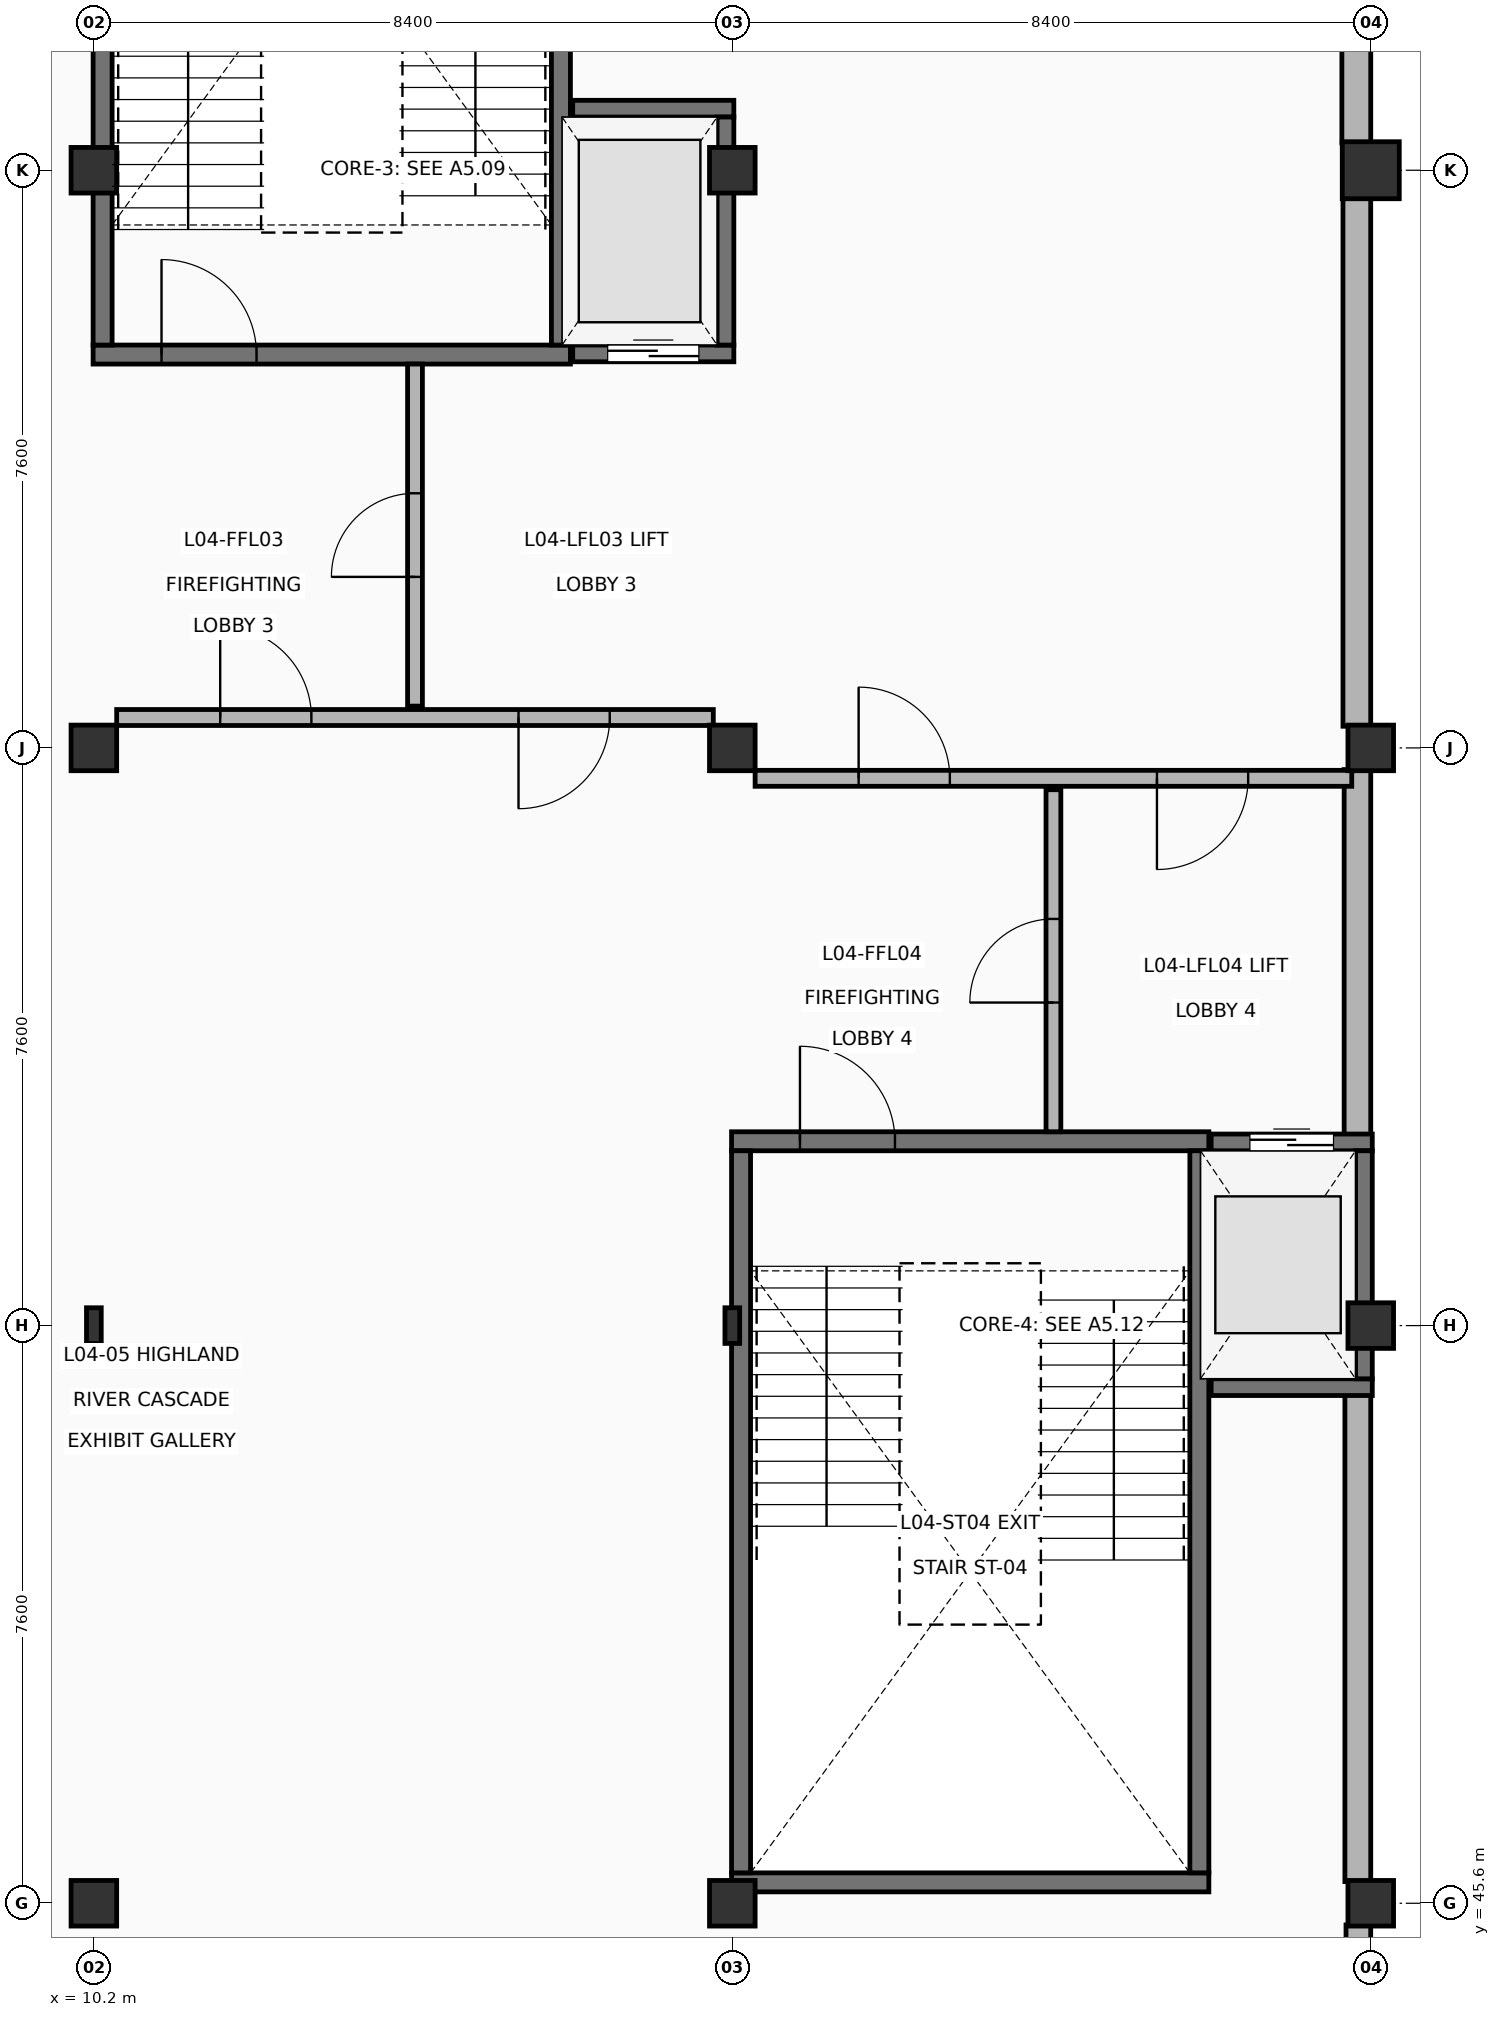
"""IFC4 building model, lengths in metres.
Left out: names, types, materials, properties, quantities, classifications, styles, units other than length and angle.
Written with IfcOpenShell. Run it as: python <this file> out.ifc"""

import sys

from ifc_helpers import new_model, si_unit, direction, frame, frame_2d, origin, origin_2d, place, context, subcontext, project, spatial, rectangle, circle, i_section, extrude, element, fill, save


model = new_model("IFC4")
c1 = context("Model", 3, precision=1e-05, world=origin(), true_north=direction((0.0, 1.0)))
c2 = subcontext(c1, "Body", "Model", "MODEL_VIEW")
j1 = project(units=[si_unit("LENGTHUNIT", "METRE"), si_unit("PLANEANGLEUNIT", "RADIAN")], contexts=[c1])
p1 = place(None, origin())
s1 = spatial("IfcSite", under=j1, at=p1, CompositionType="ELEMENT")
p2 = place(p1, origin())
s2 = spatial("IfcBuilding", under=s1, at=p2, CompositionType="ELEMENT")
p3 = place(p2, frame((0.0, 0.0, 15.3)))
s3 = spatial("IfcBuildingStorey", under=s2, at=p3, CompositionType="ELEMENT", Elevation=15.3)
p4 = place(p3, frame((10.2, 45.6, 0.0), z_axis=(0.0, 0.0, 1.0), x_axis=(1.0, 0.0, 0.0)))
e1 = element("IfcColumn", 1, at=p4, inside=s3, PredefinedType="COLUMN", context=c2, shape_type="SweptSolid", body=[
    extrude(rectangle(XDim=0.6, YDim=0.6, at=origin_2d()), origin(), (0.0, 0.0, 1.0), 4.5),
])
p5 = place(p3, frame((10.2, 53.2, 0.0), z_axis=(0.0, 0.0, 1.0), x_axis=(1.0, 0.0, 0.0)))
e2 = element("IfcColumn", 2, at=p5, inside=s3, PredefinedType="COLUMN", context=c2, shape_type="SweptSolid", body=[
    extrude(i_section(OverallWidth=0.194, OverallDepth=0.469, WebThickness=0.013, FlangeThickness=0.021, at=origin_2d()), origin(), (0.0, 0.0, 1.0), 4.5),
])
for number, where, z_axis, x_axis in (
    (3, (10.2, 60.8, 0.0), (0.0, 0.0, 1.0), (1.0, 0.0, 0.0)),
    (4, (10.2, 68.4, 0.0), (0.0, 0.0, 1.0), (1.0, 0.0, 0.0)),
    (5, (18.6, 45.6, 0.0), (0.0, 0.0, 1.0), (1.0, 0.0, 0.0)),
):
    element("IfcColumn", number, at=place(p3, frame(where, z_axis=z_axis, x_axis=x_axis)), inside=s3, PredefinedType="COLUMN", context=c2, shape_type="SweptSolid", body=[
        extrude(rectangle(XDim=0.6, YDim=0.6, at=origin_2d()), origin(), (0.0, 0.0, 1.0), 4.5),
    ])
p6 = place(p3, frame((18.6, 53.2, 0.0), z_axis=(0.0, 0.0, 1.0), x_axis=(1.0, 0.0, 0.0)))
e6 = element("IfcColumn", 6, at=p6, inside=s3, PredefinedType="COLUMN", context=c2, shape_type="SweptSolid", body=[
    extrude(i_section(OverallWidth=0.194, OverallDepth=0.469, WebThickness=0.013, FlangeThickness=0.021, at=origin_2d()), origin(), (0.0, 0.0, 1.0), 4.5),
])
for number, where, z_axis, x_axis in (
    (7, (18.6, 60.8, 0.0), (0.0, 0.0, 1.0), (1.0, 0.0, 0.0)),
    (8, (18.6, 68.4, 0.0), (0.0, 0.0, 1.0), (1.0, 0.0, 0.0)),
    (9, (27.0, 45.6, 0.0), (0.0, 0.0, 1.0), (1.0, 0.0, 0.0)),
    (10, (27.0, 53.2, 0.0), (0.0, 0.0, 1.0), (1.0, 0.0, 0.0)),
    (11, (27.0, 60.8, 0.0), (0.0, 0.0, 1.0), (1.0, 0.0, 0.0)),
):
    element("IfcColumn", number, at=place(p3, frame(where, z_axis=z_axis, x_axis=x_axis)), inside=s3, PredefinedType="COLUMN", context=c2, shape_type="SweptSolid", body=[
        extrude(rectangle(XDim=0.6, YDim=0.6, at=origin_2d()), origin(), (0.0, 0.0, 1.0), 4.5),
    ])
p7 = place(p3, frame((27.0, 68.4, 0.0), z_axis=(0.0, 0.0, 1.0), x_axis=(1.0, 0.0, 0.0)))
e12 = element("IfcColumn", 12, at=p7, inside=s3, PredefinedType="COLUMN", context=c2, shape_type="SweptSolid", body=[
    extrude(circle(Radius=0.375, at=origin_2d()), origin(), (0.0, 0.0, 1.0), 4.5),
])
p8 = place(p3, frame((26.81, 75.506, 0.0), z_axis=(0.0, 0.0, 1.0), x_axis=(0.0, -1.0, 0.0)))
e13 = element("IfcWall", 13, at=p8, inside=s3, PredefinedType="SOLIDWALL", context=c2, shape_type="SweptSolid", body=[
    extrude(rectangle(XDim=6.746, YDim=0.38, at=frame_2d((3.373, 0.0))), origin(), (0.0, 0.0, 1.0), 4.26),
])
p9 = place(p8, frame((1.873, 0.0, 0.95)))
e14 = element("IfcOpeningElement", 14, at=p9, cuts=e13, PredefinedType="OPENING", context=c2, shape_type="SweptSolid", body=[
    extrude(rectangle(XDim=3.0, YDim=2.2, at=frame_2d((1.5, 1.1))), frame((0.0, 0.2, 0.0), z_axis=(0.0, -1.0, 0.0), x_axis=(1.0, 0.0, 0.0)), (0.0, 0.0, 1.0), 0.4),
])
p10 = place(p3, frame((26.817, 68.04, 0.0), z_axis=(0.0, 0.0, 1.0), x_axis=(0.0, -1.0, 0.0)))
e15 = element("IfcWall", 15, at=p10, inside=s3, PredefinedType="SOLIDWALL", context=c2, shape_type="SweptSolid", body=[
    extrude(rectangle(XDim=6.955, YDim=0.365, at=frame_2d((3.478, 0.0))), origin(), (0.0, 0.0, 1.0), 3.816),
])
p11 = place(p3, frame((26.825, 60.515, 0.0), z_axis=(0.0, 0.0, 1.0), x_axis=(0.0, -1.0, 0.0)))
e16 = element("IfcWall", 16, at=p11, inside=s3, PredefinedType="SOLIDWALL", context=c2, shape_type="SweptSolid", body=[
    extrude(rectangle(XDim=4.835, YDim=0.35, at=frame_2d((2.417, 0.0))), origin(), (0.0, 0.0, 1.0), 4.035),
])
p12 = place(p3, frame((26.83, 52.32, 0.0), z_axis=(0.0, 0.0, 1.0), x_axis=(0.0, -1.0, 0.0)))
e17 = element("IfcWall", 17, at=p12, inside=s3, PredefinedType="SOLIDWALL", context=c2, shape_type="SweptSolid", body=[
    extrude(rectangle(XDim=6.435, YDim=0.34, at=frame_2d((3.218, 0.0))), origin(), (0.0, 0.0, 1.0), 3.816),
])
p13 = place(p3, frame((26.837, 45.315, 0.0), z_axis=(0.0, 0.0, 1.0), x_axis=(0.0, -1.0, 0.0)))
e18 = element("IfcWall", 18, at=p13, inside=s3, PredefinedType="SOLIDWALL", context=c2, shape_type="SweptSolid", body=[
    extrude(rectangle(XDim=7.03, YDim=0.325, at=frame_2d((3.515, 0.0))), origin(), (0.0, 0.0, 1.0), 4.035),
])
p14 = place(p3, frame((10.19, 65.975, 0.0), z_axis=(0.0, 0.0, 1.0), x_axis=(1.0, 0.0, 0.0)))
e19 = element("IfcWall", 19, at=p14, inside=s3, PredefinedType="SHEAR", context=c2, shape_type="SweptSolid", body=[
    extrude(rectangle(XDim=6.28, YDim=0.25, at=frame_2d((3.14, 0.0))), origin(), (0.0, 0.0, 1.0), 4.29),
])
p15 = place(p14, frame((0.9, 0.0, 0.0)))
e20 = element("IfcOpeningElement", 20, at=p15, cuts=e19, PredefinedType="OPENING", context=c2, shape_type="SweptSolid", body=[
    extrude(rectangle(XDim=1.25, YDim=2.2, at=frame_2d((0.625, 1.1))), frame((0.0, 0.135, 0.0), z_axis=(0.0, -1.0, 0.0), x_axis=(1.0, 0.0, 0.0)), (0.0, 0.0, 1.0), 0.27),
])
for number, where, z_axis, x_axis in (
    (21, (10.315, 66.1, 0.0), (0.0, 0.0, 1.0), (0.0, 1.0, 0.0)),
    (22, (16.345, 66.1, 0.0), (0.0, 0.0, 1.0), (0.0, 1.0, 0.0)),
):
    element("IfcWall", number, at=place(p3, frame(where, z_axis=z_axis, x_axis=x_axis)), inside=s3, PredefinedType="SHEAR", context=c2, shape_type="SweptSolid", body=[
        extrude(rectangle(XDim=9.5, YDim=0.25, at=frame_2d((4.75, 0.0))), origin(), (0.0, 0.0, 1.0), 4.29),
    ])
p16 = place(p3, frame((16.5, 65.99, 0.0), z_axis=(0.0, 0.0, 1.0), x_axis=(1.0, 0.0, 0.0)))
e23 = element("IfcWall", 23, at=p16, inside=s3, PredefinedType="SHEAR", context=c2, shape_type="SweptSolid", body=[
    extrude(rectangle(XDim=2.12, YDim=0.22, at=frame_2d((1.06, 0.0))), origin(), (0.0, 0.0, 1.0), 4.29),
])
p17 = place(p16, frame((0.46, 0.0, 0.0)))
e24 = element("IfcOpeningElement", 24, at=p17, cuts=e23, PredefinedType="OPENING", context=c2, shape_type="SweptSolid", body=[
    extrude(rectangle(XDim=1.2, YDim=2.2, at=frame_2d((0.6, 1.1))), frame((0.0, 0.12, 0.0), z_axis=(0.0, -1.0, 0.0), x_axis=(1.0, 0.0, 0.0)), (0.0, 0.0, 1.0), 0.24),
])
p18 = place(p3, frame((16.5, 69.21, 0.0), z_axis=(0.0, 0.0, 1.0), x_axis=(1.0, 0.0, 0.0)))
e25 = element("IfcWall", 25, at=p18, inside=s3, PredefinedType="SHEAR", context=c2, shape_type="SweptSolid", body=[
    extrude(rectangle(XDim=2.12, YDim=0.22, at=frame_2d((1.06, 0.0))), origin(), (0.0, 0.0, 1.0), 4.29),
])
p19 = place(p3, frame((18.51, 66.1, 0.0), z_axis=(0.0, 0.0, 1.0), x_axis=(0.0, 1.0, 0.0)))
e26 = element("IfcWall", 26, at=p19, inside=s3, PredefinedType="SHEAR", context=c2, shape_type="SweptSolid", body=[
    extrude(rectangle(XDim=3.0, YDim=0.22, at=frame_2d((1.5, 0.0))), origin(), (0.0, 0.0, 1.0), 4.29),
])
p20 = place(p3, frame((10.5, 61.2, 0.0), z_axis=(0.0, 0.0, 1.0), x_axis=(1.0, 0.0, 0.0)))
e27 = element("IfcWall", 27, at=p20, inside=s3, PredefinedType="PARTITIONING", context=c2, shape_type="SweptSolid", body=[
    extrude(rectangle(XDim=7.85, YDim=0.21, at=frame_2d((3.925, 0.0))), origin(), (0.0, 0.0, 1.0), 4.29),
])
p21 = place(p20, frame((1.362, 0.0, 0.0)))
e28 = element("IfcOpeningElement", 28, at=p21, cuts=e27, PredefinedType="OPENING", context=c2, shape_type="SweptSolid", body=[
    extrude(rectangle(XDim=1.2, YDim=2.2, at=frame_2d((0.6, 1.1))), frame((0.0, 0.115, 0.0), z_axis=(0.0, -1.0, 0.0), x_axis=(1.0, 0.0, 0.0)), (0.0, 0.0, 1.0), 0.23),
])
p22 = place(p20, frame((5.287, 0.0, 0.0)))
e29 = element("IfcOpeningElement", 29, at=p22, cuts=e27, PredefinedType="OPENING", context=c2, shape_type="SweptSolid", body=[
    extrude(rectangle(XDim=1.2, YDim=2.2, at=frame_2d((0.6, 1.1))), frame((0.0, 0.115, 0.0), z_axis=(0.0, -1.0, 0.0), x_axis=(1.0, 0.0, 0.0)), (0.0, 0.0, 1.0), 0.23),
])
p23 = place(p3, frame((14.425, 61.35, 0.0), z_axis=(0.0, 0.0, 1.0), x_axis=(0.0, 1.0, 0.0)))
e30 = element("IfcWall", 30, at=p23, inside=s3, PredefinedType="PARTITIONING", context=c2, shape_type="SweptSolid", body=[
    extrude(rectangle(XDim=4.5, YDim=0.195, at=frame_2d((2.25, 0.0))), origin(), (0.0, 0.0, 1.0), 4.29),
])
p24 = place(p23, frame((1.7, 0.0, 0.0)))
e31 = element("IfcOpeningElement", 31, at=p24, cuts=e30, PredefinedType="OPENING", context=c2, shape_type="SweptSolid", body=[
    extrude(rectangle(XDim=1.1, YDim=2.15, at=frame_2d((0.55, 1.075))), frame((0.0, 0.107, 0.0), z_axis=(0.0, -1.0, 0.0), x_axis=(1.0, 0.0, 0.0)), (0.0, 0.0, 1.0), 0.215),
])
p25 = place(p3, frame((18.59, 45.875, 0.0), z_axis=(0.0, 0.0, 1.0), x_axis=(1.0, 0.0, 0.0)))
e32 = element("IfcWall", 32, at=p25, inside=s3, PredefinedType="SHEAR", context=c2, shape_type="SweptSolid", body=[
    extrude(rectangle(XDim=6.28, YDim=0.25, at=frame_2d((3.14, 0.0))), origin(), (0.0, 0.0, 1.0), 4.29),
])
p26 = place(p3, frame((18.59, 55.625, 0.0), z_axis=(0.0, 0.0, 1.0), x_axis=(1.0, 0.0, 0.0)))
e33 = element("IfcWall", 33, at=p26, inside=s3, PredefinedType="SHEAR", context=c2, shape_type="SweptSolid", body=[
    extrude(rectangle(XDim=6.28, YDim=0.25, at=frame_2d((3.14, 0.0))), origin(), (0.0, 0.0, 1.0), 4.29),
])
p27 = place(p26, frame((0.9, 0.0, 0.0)))
e34 = element("IfcOpeningElement", 34, at=p27, cuts=e33, PredefinedType="OPENING", context=c2, shape_type="SweptSolid", body=[
    extrude(rectangle(XDim=1.25, YDim=2.2, at=frame_2d((0.625, 1.1))), frame((0.0, 0.135, 0.0), z_axis=(0.0, -1.0, 0.0), x_axis=(1.0, 0.0, 0.0)), (0.0, 0.0, 1.0), 0.27),
])
for number, where, z_axis, x_axis in (
    (35, (18.715, 46.0, 0.0), (0.0, 0.0, 1.0), (0.0, 1.0, 0.0)),
    (36, (24.745, 46.0, 0.0), (0.0, 0.0, 1.0), (0.0, 1.0, 0.0)),
):
    element("IfcWall", number, at=place(p3, frame(where, z_axis=z_axis, x_axis=x_axis)), inside=s3, PredefinedType="SHEAR", context=c2, shape_type="SweptSolid", body=[
        extrude(rectangle(XDim=9.5, YDim=0.25, at=frame_2d((4.75, 0.0))), origin(), (0.0, 0.0, 1.0), 4.29),
    ])
p28 = place(p3, frame((24.9, 52.39, 0.0), z_axis=(0.0, 0.0, 1.0), x_axis=(1.0, 0.0, 0.0)))
e37 = element("IfcWall", 37, at=p28, inside=s3, PredefinedType="SHEAR", context=c2, shape_type="SweptSolid", body=[
    extrude(rectangle(XDim=2.12, YDim=0.22, at=frame_2d((1.06, 0.0))), origin(), (0.0, 0.0, 1.0), 4.29),
])
p29 = place(p3, frame((24.9, 55.61, 0.0), z_axis=(0.0, 0.0, 1.0), x_axis=(1.0, 0.0, 0.0)))
e38 = element("IfcWall", 38, at=p29, inside=s3, PredefinedType="SHEAR", context=c2, shape_type="SweptSolid", body=[
    extrude(rectangle(XDim=2.12, YDim=0.22, at=frame_2d((1.06, 0.0))), origin(), (0.0, 0.0, 1.0), 4.29),
])
p30 = place(p29, frame((0.51, 0.0, 0.0)))
e39 = element("IfcOpeningElement", 39, at=p30, cuts=e38, PredefinedType="OPENING", context=c2, shape_type="SweptSolid", body=[
    extrude(rectangle(XDim=1.1, YDim=2.15, at=frame_2d((0.55, 1.075))), frame((0.0, 0.12, 0.0), z_axis=(0.0, -1.0, 0.0), x_axis=(1.0, 0.0, 0.0)), (0.0, 0.0, 1.0), 0.24),
])
p31 = place(p3, frame((26.91, 52.5, 0.0), z_axis=(0.0, 0.0, 1.0), x_axis=(0.0, 1.0, 0.0)))
e40 = element("IfcWall", 40, at=p31, inside=s3, PredefinedType="SHEAR", context=c2, shape_type="SweptSolid", body=[
    extrude(rectangle(XDim=3.0, YDim=0.22, at=frame_2d((1.5, 0.0))), origin(), (0.0, 0.0, 1.0), 4.29),
])
p32 = place(p3, frame((18.9, 60.4, 0.0), z_axis=(0.0, 0.0, 1.0), x_axis=(1.0, 0.0, 0.0)))
e41 = element("IfcWall", 41, at=p32, inside=s3, PredefinedType="PARTITIONING", context=c2, shape_type="SweptSolid", body=[
    extrude(rectangle(XDim=7.85, YDim=0.21, at=frame_2d((3.925, 0.0))), origin(), (0.0, 0.0, 1.0), 4.29),
])
p33 = place(p32, frame((1.362, 0.0, 0.0)))
e42 = element("IfcOpeningElement", 42, at=p33, cuts=e41, PredefinedType="OPENING", context=c2, shape_type="SweptSolid", body=[
    extrude(rectangle(XDim=1.2, YDim=2.2, at=frame_2d((0.6, 1.1))), frame((0.0, 0.115, 0.0), z_axis=(0.0, -1.0, 0.0), x_axis=(1.0, 0.0, 0.0)), (0.0, 0.0, 1.0), 0.23),
])
p34 = place(p32, frame((5.287, 0.0, 0.0)))
e43 = element("IfcOpeningElement", 43, at=p34, cuts=e41, PredefinedType="OPENING", context=c2, shape_type="SweptSolid", body=[
    extrude(rectangle(XDim=1.2, YDim=2.2, at=frame_2d((0.6, 1.1))), frame((0.0, 0.115, 0.0), z_axis=(0.0, -1.0, 0.0), x_axis=(1.0, 0.0, 0.0)), (0.0, 0.0, 1.0), 0.23),
])
p35 = place(p3, frame((22.825, 55.75, 0.0), z_axis=(0.0, 0.0, 1.0), x_axis=(0.0, 1.0, 0.0)))
e44 = element("IfcWall", 44, at=p35, inside=s3, PredefinedType="PARTITIONING", context=c2, shape_type="SweptSolid", body=[
    extrude(rectangle(XDim=4.5, YDim=0.195, at=frame_2d((2.25, 0.0))), origin(), (0.0, 0.0, 1.0), 4.29),
])
p36 = place(p35, frame((1.7, 0.0, 0.0)))
e45 = element("IfcOpeningElement", 45, at=p36, cuts=e44, PredefinedType="OPENING", context=c2, shape_type="SweptSolid", body=[
    extrude(rectangle(XDim=1.1, YDim=2.15, at=frame_2d((0.55, 1.075))), frame((0.0, 0.107, 0.0), z_axis=(0.0, -1.0, 0.0), x_axis=(1.0, 0.0, 0.0)), (0.0, 0.0, 1.0), 0.215),
])
p37 = place(p15, origin())
e46 = element("IfcDoor", 46, at=p37, inside=s3, OperationType="SINGLE_SWING_LEFT", PredefinedType="DOOR", context=c2, shape_type="SweptSolid", body=[
    extrude(rectangle(XDim=1.25, YDim=2.2, at=frame_2d((0.625, 1.1))), frame((0.0, 0.025, 0.0), z_axis=(0.0, -1.0, 0.0), x_axis=(1.0, 0.0, 0.0)), (0.0, 0.0, 1.0), 0.05),
])
fill(e20, e46)
p38 = place(p17, origin())
e47 = element("IfcDoor", 47, at=p38, inside=s3, OperationType="DOUBLE_DOOR_SLIDING", PredefinedType="DOOR", context=c2, shape_type="SweptSolid", body=[
    extrude(rectangle(XDim=1.2, YDim=2.2, at=frame_2d((0.6, 1.1))), frame((0.0, 0.025, 0.0), z_axis=(0.0, -1.0, 0.0), x_axis=(1.0, 0.0, 0.0)), (0.0, 0.0, 1.0), 0.05),
])
fill(e24, e47)
p39 = place(p21, origin())
e48 = element("IfcDoor", 48, at=p39, inside=s3, OperationType="SINGLE_SWING_LEFT", PredefinedType="DOOR", context=c2, shape_type="SweptSolid", body=[
    extrude(rectangle(XDim=1.2, YDim=2.2, at=frame_2d((0.6, 1.1))), frame((0.0, 0.025, 0.0), z_axis=(0.0, -1.0, 0.0), x_axis=(1.0, 0.0, 0.0)), (0.0, 0.0, 1.0), 0.05),
])
fill(e28, e48)
p40 = place(p22, origin())
e49 = element("IfcDoor", 49, at=p40, inside=s3, OperationType="SINGLE_SWING_RIGHT", PredefinedType="DOOR", context=c2, shape_type="SweptSolid", body=[
    extrude(rectangle(XDim=1.2, YDim=2.2, at=frame_2d((0.6, 1.1))), frame((0.0, 0.025, 0.0), z_axis=(0.0, -1.0, 0.0), x_axis=(1.0, 0.0, 0.0)), (0.0, 0.0, 1.0), 0.05),
])
fill(e29, e49)
p41 = place(p24, origin())
e50 = element("IfcDoor", 50, at=p41, inside=s3, OperationType="SINGLE_SWING_LEFT", PredefinedType="DOOR", context=c2, shape_type="SweptSolid", body=[
    extrude(rectangle(XDim=1.1, YDim=2.15, at=frame_2d((0.55, 1.075))), frame((0.0, 0.025, 0.0), z_axis=(0.0, -1.0, 0.0), x_axis=(1.0, 0.0, 0.0)), (0.0, 0.0, 1.0), 0.05),
])
fill(e31, e50)
p42 = place(p27, origin())
e51 = element("IfcDoor", 51, at=p42, inside=s3, OperationType="SINGLE_SWING_LEFT", PredefinedType="DOOR", context=c2, shape_type="SweptSolid", body=[
    extrude(rectangle(XDim=1.25, YDim=2.2, at=frame_2d((0.625, 1.1))), frame((0.0, 0.025, 0.0), z_axis=(0.0, -1.0, 0.0), x_axis=(1.0, 0.0, 0.0)), (0.0, 0.0, 1.0), 0.05),
])
fill(e34, e51)
p43 = place(p30, origin())
e52 = element("IfcDoor", 52, at=p43, inside=s3, OperationType="DOUBLE_DOOR_SLIDING", PredefinedType="DOOR", context=c2, shape_type="SweptSolid", body=[
    extrude(rectangle(XDim=1.1, YDim=2.15, at=frame_2d((0.55, 1.075))), frame((0.0, 0.025, 0.0), z_axis=(0.0, -1.0, 0.0), x_axis=(1.0, 0.0, 0.0)), (0.0, 0.0, 1.0), 0.05),
])
fill(e39, e52)
p44 = place(p33, origin())
e53 = element("IfcDoor", 53, at=p44, inside=s3, OperationType="SINGLE_SWING_LEFT", PredefinedType="DOOR", context=c2, shape_type="SweptSolid", body=[
    extrude(rectangle(XDim=1.2, YDim=2.2, at=frame_2d((0.6, 1.1))), frame((0.0, 0.025, 0.0), z_axis=(0.0, -1.0, 0.0), x_axis=(1.0, 0.0, 0.0)), (0.0, 0.0, 1.0), 0.05),
])
fill(e42, e53)
p45 = place(p34, origin())
e54 = element("IfcDoor", 54, at=p45, inside=s3, OperationType="SINGLE_SWING_RIGHT", PredefinedType="DOOR", context=c2, shape_type="SweptSolid", body=[
    extrude(rectangle(XDim=1.2, YDim=2.2, at=frame_2d((0.6, 1.1))), frame((0.0, 0.025, 0.0), z_axis=(0.0, -1.0, 0.0), x_axis=(1.0, 0.0, 0.0)), (0.0, 0.0, 1.0), 0.05),
])
fill(e43, e54)
p46 = place(p36, origin())
e55 = element("IfcDoor", 55, at=p46, inside=s3, OperationType="SINGLE_SWING_LEFT", PredefinedType="DOOR", context=c2, shape_type="SweptSolid", body=[
    extrude(rectangle(XDim=1.1, YDim=2.15, at=frame_2d((0.55, 1.075))), frame((0.0, 0.025, 0.0), z_axis=(0.0, -1.0, 0.0), x_axis=(1.0, 0.0, 0.0)), (0.0, 0.0, 1.0), 0.05),
])
fill(e45, e55)
save(model, sys.argv[1])
